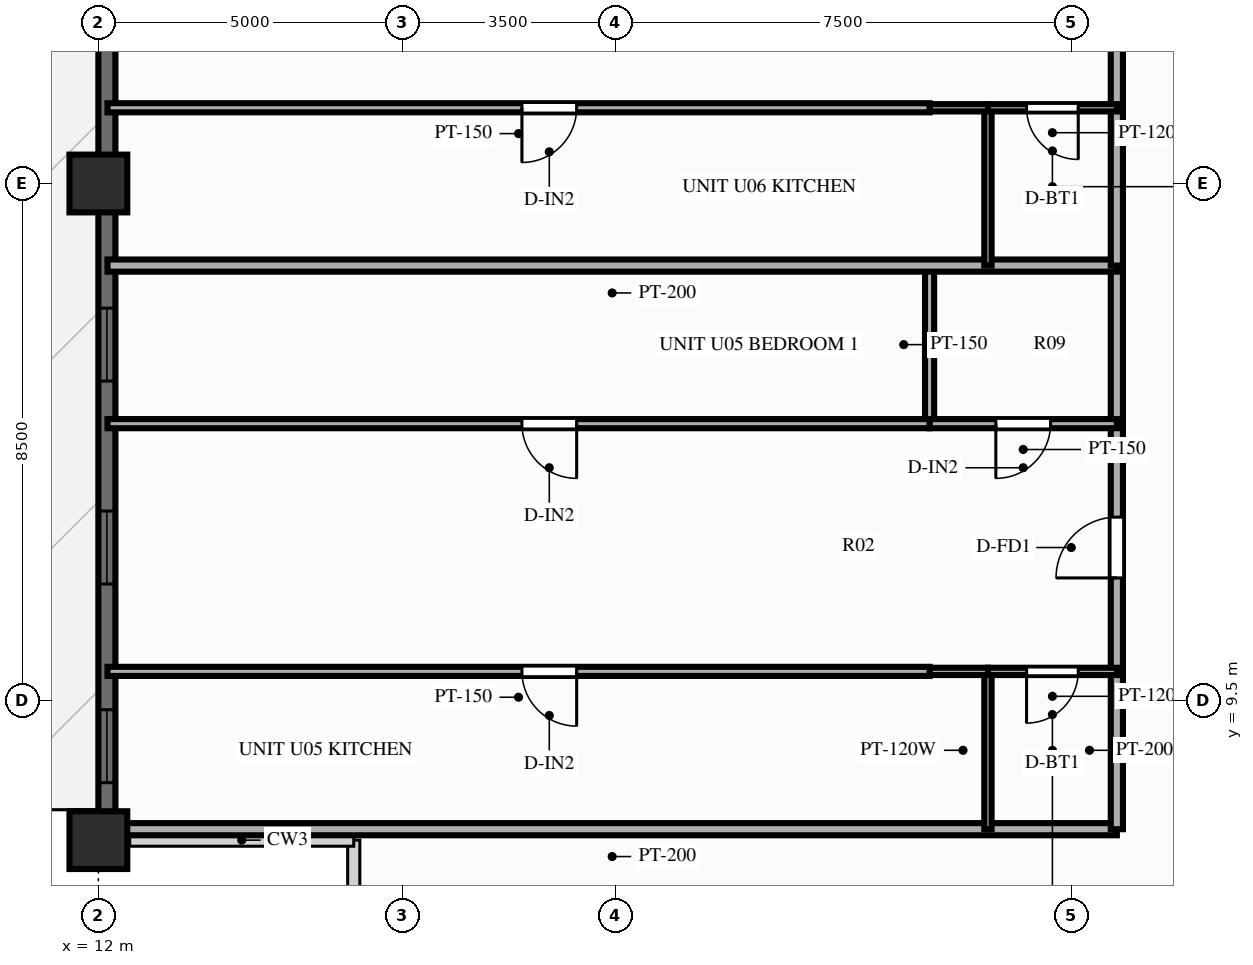
"""IFC4 building model, lengths in metres.
Left out: names, types, materials, properties, quantities, classifications, styles, units other than length and angle.
Written with IfcOpenShell. Run it as: python <this file> out.ifc"""

import sys

from ifc_helpers import new_model, si_unit, direction, frame, frame_2d, origin, origin_2d, place, context, subcontext, project, spatial, rectangle, extrude, source, transform, mapped, element, fill, save


model = new_model("IFC4")
c1 = context("Model", 3, precision=1e-05, world=origin(), true_north=direction((0.0, 1.0)))
c2 = subcontext(c1, "Body", "Model", "MODEL_VIEW")
j1 = project(units=[si_unit("LENGTHUNIT", "METRE"), si_unit("PLANEANGLEUNIT", "RADIAN")], contexts=[c1])
p1 = place(None, origin())
s1 = spatial("IfcSite", under=j1, at=p1, CompositionType="ELEMENT")
p2 = place(p1, origin())
s2 = spatial("IfcBuilding", under=s1, at=p2, CompositionType="ELEMENT")
p3 = place(p2, frame((0.0, 0.0, 116.85)))
s3 = spatial("IfcBuildingStorey", under=s2, at=p3, CompositionType="ELEMENT", Elevation=116.85)
m1 = source(origin(), c2, "Body", "SweptSolid", [
    extrude(rectangle(XDim=0.95, YDim=0.95, at=origin_2d()), origin(), (0.0, 0.0, 1.0), 3.0),
])
for number, where, z_axis, x_axis in (
    (1, (12.0, 18.0, 0.0), (0.0, 0.0, 1.0), (1.0, 0.0, 0.0)),
    (2, (12.0, 7.2, 0.0), (0.0, 0.0, 1.0), (1.0, 0.0, 0.0)),
):
    element("IfcColumn", number, at=place(p3, frame(where, z_axis=z_axis, x_axis=x_axis)), inside=s3, PredefinedType="COLUMN", context=c2, shape_type="MappedRepresentation", body=[
        mapped(m1, transform((0.0, 0.0, 0.0), scale=1.0)),
    ])
p4 = place(p3, frame((12.14, 7.2, 0.0), z_axis=(0.0, 0.0, 1.0), x_axis=(0.0, 1.0, 0.0)))
e3 = element("IfcWall", 3, at=p4, inside=s3, PredefinedType="SOLIDWALL", context=c2, shape_type="SweptSolid", body=[
    extrude(rectangle(XDim=39.6, YDim=0.28, at=frame_2d((19.8, 0.0))), origin(), (0.0, 0.0, 1.0), 2.28),
])
p5 = place(p4, frame((0.945, 0.0, 0.25)))
e4 = element("IfcOpeningElement", 4, at=p5, cuts=e3, PredefinedType="OPENING", context=c2, shape_type="SweptSolid", body=[
    extrude(rectangle(XDim=1.2, YDim=1.5, at=frame_2d((0.6, 0.75))), frame((0.0, 0.152, 0.0), z_axis=(0.0, -1.0, 0.0), x_axis=(1.0, 0.0, 0.0)), (0.0, 0.0, 1.0), 0.304),
])
p6 = place(p4, frame((4.213, 0.0, 0.25)))
e5 = element("IfcOpeningElement", 5, at=p6, cuts=e3, PredefinedType="OPENING", context=c2, shape_type="SweptSolid", body=[
    extrude(rectangle(XDim=1.2, YDim=1.5, at=frame_2d((0.6, 0.75))), frame((0.0, 0.152, 0.0), z_axis=(0.0, -1.0, 0.0), x_axis=(1.0, 0.0, 0.0)), (0.0, 0.0, 1.0), 0.304),
])
p7 = place(p4, frame((7.55, 0.0, 0.25)))
e6 = element("IfcOpeningElement", 6, at=p7, cuts=e3, PredefinedType="OPENING", context=c2, shape_type="SweptSolid", body=[
    extrude(rectangle(XDim=1.2, YDim=1.5, at=frame_2d((0.6, 0.75))), frame((0.0, 0.152, 0.0), z_axis=(0.0, -1.0, 0.0), x_axis=(1.0, 0.0, 0.0)), (0.0, 0.0, 1.0), 0.304),
])
p8 = place(p4, frame((13.483, 0.0, 0.25)))
e7 = element("IfcOpeningElement", 7, at=p8, cuts=e3, PredefinedType="OPENING", context=c2, shape_type="SweptSolid", body=[
    extrude(rectangle(XDim=1.2, YDim=1.5, at=frame_2d((0.6, 0.75))), frame((0.0, 0.152, 0.0), z_axis=(0.0, -1.0, 0.0), x_axis=(1.0, 0.0, 0.0)), (0.0, 0.0, 1.0), 0.304),
])
p9 = place(p4, frame((16.82, 0.0, 0.25)))
e8 = element("IfcOpeningElement", 8, at=p9, cuts=e3, PredefinedType="OPENING", context=c2, shape_type="SweptSolid", body=[
    extrude(rectangle(XDim=1.2, YDim=1.5, at=frame_2d((0.6, 0.75))), frame((0.0, 0.152, 0.0), z_axis=(0.0, -1.0, 0.0), x_axis=(1.0, 0.0, 0.0)), (0.0, 0.0, 1.0), 0.304),
])
p10 = place(p4, frame((19.2, 0.0, 0.25)))
e9 = element("IfcOpeningElement", 9, at=p10, cuts=e3, PredefinedType="OPENING", context=c2, shape_type="SweptSolid", body=[
    extrude(rectangle(XDim=1.2, YDim=1.5, at=frame_2d((0.6, 0.75))), frame((0.0, 0.152, 0.0), z_axis=(0.0, -1.0, 0.0), x_axis=(1.0, 0.0, 0.0)), (0.0, 0.0, 1.0), 0.304),
])
p11 = place(p4, frame((21.992, 0.0, 0.0)))
e10 = element("IfcOpeningElement", 10, at=p11, cuts=e3, PredefinedType="OPENING", context=c2, shape_type="SweptSolid", body=[
    extrude(rectangle(XDim=1.6, YDim=2.15, at=frame_2d((0.8, 1.075))), frame((0.0, 0.152, 0.0), z_axis=(0.0, -1.0, 0.0), x_axis=(1.0, 0.0, 0.0)), (0.0, 0.0, 1.0), 0.304),
])
p12 = place(p4, frame((25.529, 0.0, 0.25)))
e11 = element("IfcOpeningElement", 11, at=p12, cuts=e3, PredefinedType="OPENING", context=c2, shape_type="SweptSolid", body=[
    extrude(rectangle(XDim=1.2, YDim=1.5, at=frame_2d((0.6, 0.75))), frame((0.0, 0.152, 0.0), z_axis=(0.0, -1.0, 0.0), x_axis=(1.0, 0.0, 0.0)), (0.0, 0.0, 1.0), 0.304),
])
p13 = place(p4, frame((29.349, 0.0, 0.25)))
e12 = element("IfcOpeningElement", 12, at=p13, cuts=e3, PredefinedType="OPENING", context=c2, shape_type="SweptSolid", body=[
    extrude(rectangle(XDim=0.7, YDim=1.5, at=frame_2d((0.35, 0.75))), frame((0.0, 0.152, 0.0), z_axis=(0.0, -1.0, 0.0), x_axis=(1.0, 0.0, 0.0)), (0.0, 0.0, 1.0), 0.304),
])
p14 = place(p4, frame((31.285, 0.0, 0.25)))
e13 = element("IfcOpeningElement", 13, at=p14, cuts=e3, PredefinedType="OPENING", context=c2, shape_type="SweptSolid", body=[
    extrude(rectangle(XDim=1.2, YDim=1.5, at=frame_2d((0.6, 0.75))), frame((0.0, 0.152, 0.0), z_axis=(0.0, -1.0, 0.0), x_axis=(1.0, 0.0, 0.0)), (0.0, 0.0, 1.0), 0.304),
])
p15 = place(p4, frame((34.252, 0.0, 0.25)))
e14 = element("IfcOpeningElement", 14, at=p15, cuts=e3, PredefinedType="OPENING", context=c2, shape_type="SweptSolid", body=[
    extrude(rectangle(XDim=1.2, YDim=1.5, at=frame_2d((0.6, 0.75))), frame((0.0, 0.152, 0.0), z_axis=(0.0, -1.0, 0.0), x_axis=(1.0, 0.0, 0.0)), (0.0, 0.0, 1.0), 0.304),
])
p16 = place(p4, frame((37.151, 0.0, 0.25)))
e15 = element("IfcOpeningElement", 15, at=p16, cuts=e3, PredefinedType="OPENING", context=c2, shape_type="SweptSolid", body=[
    extrude(rectangle(XDim=1.2, YDim=1.5, at=frame_2d((0.6, 0.75))), frame((0.0, 0.152, 0.0), z_axis=(0.0, -1.0, 0.0), x_axis=(1.0, 0.0, 0.0)), (0.0, 0.0, 1.0), 0.304),
])
p17 = place(p3, frame((28.75, 7.38, 0.0), z_axis=(0.0, 0.0, 1.0), x_axis=(-1.0, 0.0, 0.0)))
e16 = element("IfcWall", 16, at=p17, inside=s3, PredefinedType="PARTITIONING", context=c2, shape_type="SweptSolid", body=[
    extrude(rectangle(XDim=16.6, YDim=0.2, at=frame_2d((8.3, 0.0))), origin(), (0.0, 0.0, 1.0), 2.79),
])
p18 = place(p3, frame((28.75, 7.38, 0.0), z_axis=(0.0, 0.0, 1.0), x_axis=(0.0, 1.0, 0.0)))
e17 = element("IfcWall", 17, at=p18, inside=s3, PredefinedType="PARTITIONING", context=c2, shape_type="SweptSolid", body=[
    extrude(rectangle(XDim=2.596, YDim=0.2, at=frame_2d((1.298, 0.0))), origin(), (0.0, 0.0, 1.0), 2.79),
])
p19 = place(p3, frame((28.75, 9.976, 0.0), z_axis=(0.0, 0.0, 1.0), x_axis=(0.0, 1.0, 0.0)))
e18 = element("IfcWall", 18, at=p19, inside=s3, PredefinedType="PARTITIONING", context=c2, shape_type="SweptSolid", body=[
    extrude(rectangle(XDim=4.074, YDim=0.2, at=frame_2d((2.037, 0.0))), origin(), (0.0, 0.0, 1.0), 2.79),
])
p20 = place(p19, frame((1.537, 0.0, 0.0)))
e19 = element("IfcOpeningElement", 19, at=p20, cuts=e18, PredefinedType="OPENING", context=c2, shape_type="SweptSolid", body=[
    extrude(rectangle(XDim=1.0, YDim=2.15, at=frame_2d((0.5, 1.075))), frame((0.0, 0.112, 0.0), z_axis=(0.0, -1.0, 0.0), x_axis=(1.0, 0.0, 0.0)), (0.0, 0.0, 1.0), 0.224),
])
p21 = place(p3, frame((28.75, 14.05, 0.0), z_axis=(0.0, 0.0, 1.0), x_axis=(0.0, 1.0, 0.0)))
e20 = element("IfcWall", 20, at=p21, inside=s3, PredefinedType="PARTITIONING", context=c2, shape_type="SweptSolid", body=[
    extrude(rectangle(XDim=2.6, YDim=0.2, at=frame_2d((1.3, 0.0))), origin(), (0.0, 0.0, 1.0), 2.79),
])
p22 = place(p3, frame((26.63, 7.38, 0.0), z_axis=(0.0, 0.0, 1.0), x_axis=(0.0, 1.0, 0.0)))
e21 = element("IfcWall", 21, at=p22, inside=s3, PredefinedType="PARTITIONING", context=c2, shape_type="SweptSolid", body=[
    extrude(rectangle(XDim=2.596, YDim=0.12, at=frame_2d((1.298, 0.0))), origin(), (0.0, 0.0, 1.0), 2.79),
])
p23 = place(p3, frame((25.67, 14.05, 0.0), z_axis=(0.0, 0.0, 1.0), x_axis=(0.0, 1.0, 0.0)))
e22 = element("IfcWall", 22, at=p23, inside=s3, PredefinedType="PARTITIONING", context=c2, shape_type="SweptSolid", body=[
    extrude(rectangle(XDim=2.6, YDim=0.15, at=frame_2d((1.3, 0.0))), origin(), (0.0, 0.0, 1.0), 2.79),
])
p24 = place(p3, frame((28.75, 9.976, 0.0), z_axis=(0.0, 0.0, 1.0), x_axis=(-1.0, 0.0, 0.0)))
e23 = element("IfcWall", 23, at=p24, inside=s3, PredefinedType="PARTITIONING", context=c2, shape_type="SweptSolid", body=[
    extrude(rectangle(XDim=2.12, YDim=0.12, at=frame_2d((1.06, 0.0))), origin(), (0.0, 0.0, 1.0), 2.79),
])
p25 = place(p24, frame((0.635, 0.0, 0.0)))
e24 = element("IfcOpeningElement", 24, at=p25, cuts=e23, PredefinedType="OPENING", context=c2, shape_type="SweptSolid", body=[
    extrude(rectangle(XDim=0.85, YDim=2.05, at=frame_2d((0.425, 1.025))), frame((0.0, 0.072, 0.0), z_axis=(0.0, -1.0, 0.0), x_axis=(1.0, 0.0, 0.0)), (0.0, 0.0, 1.0), 0.144),
])
p26 = place(p3, frame((26.63, 9.976, 0.0), z_axis=(0.0, 0.0, 1.0), x_axis=(-1.0, 0.0, 0.0)))
e25 = element("IfcWall", 25, at=p26, inside=s3, PredefinedType="PARTITIONING", context=c2, shape_type="SweptSolid", body=[
    extrude(rectangle(XDim=0.96, YDim=0.12, at=frame_2d((0.48, 0.0))), origin(), (0.0, 0.0, 1.0), 2.79),
])
p27 = place(p3, frame((25.67, 9.976, 0.0), z_axis=(0.0, 0.0, 1.0), x_axis=(-1.0, 0.0, 0.0)))
e26 = element("IfcWall", 26, at=p27, inside=s3, PredefinedType="PARTITIONING", context=c2, shape_type="SweptSolid", body=[
    extrude(rectangle(XDim=13.52, YDim=0.15, at=frame_2d((6.76, 0.0))), origin(), (0.0, 0.0, 1.0), 2.79),
])
p28 = place(p27, frame((5.804, 0.0, 0.0)))
e27 = element("IfcOpeningElement", 27, at=p28, cuts=e26, PredefinedType="OPENING", context=c2, shape_type="SweptSolid", body=[
    extrude(rectangle(XDim=0.9, YDim=2.1, at=frame_2d((0.45, 1.05))), frame((0.0, 0.087, 0.0), z_axis=(0.0, -1.0, 0.0), x_axis=(1.0, 0.0, 0.0)), (0.0, 0.0, 1.0), 0.174),
])
p29 = place(p3, frame((28.75, 14.05, 0.0), z_axis=(0.0, 0.0, 1.0), x_axis=(-1.0, 0.0, 0.0)))
e28 = element("IfcWall", 28, at=p29, inside=s3, PredefinedType="PARTITIONING", context=c2, shape_type="SweptSolid", body=[
    extrude(rectangle(XDim=3.08, YDim=0.15, at=frame_2d((1.54, 0.0))), origin(), (0.0, 0.0, 1.0), 2.79),
])
p30 = place(p29, frame((1.09, 0.0, 0.0)))
e29 = element("IfcOpeningElement", 29, at=p30, cuts=e28, PredefinedType="OPENING", context=c2, shape_type="SweptSolid", body=[
    extrude(rectangle(XDim=0.9, YDim=2.1, at=frame_2d((0.45, 1.05))), frame((0.0, 0.087, 0.0), z_axis=(0.0, -1.0, 0.0), x_axis=(1.0, 0.0, 0.0)), (0.0, 0.0, 1.0), 0.174),
])
p31 = place(p3, frame((25.67, 14.05, 0.0), z_axis=(0.0, 0.0, 1.0), x_axis=(-1.0, 0.0, 0.0)))
e30 = element("IfcWall", 30, at=p31, inside=s3, PredefinedType="PARTITIONING", context=c2, shape_type="SweptSolid", body=[
    extrude(rectangle(XDim=13.52, YDim=0.15, at=frame_2d((6.76, 0.0))), origin(), (0.0, 0.0, 1.0), 2.79),
])
p32 = place(p31, frame((5.804, 0.0, 0.0)))
e31 = element("IfcOpeningElement", 31, at=p32, cuts=e30, PredefinedType="OPENING", context=c2, shape_type="SweptSolid", body=[
    extrude(rectangle(XDim=0.9, YDim=2.1, at=frame_2d((0.45, 1.05))), frame((0.0, 0.087, 0.0), z_axis=(0.0, -1.0, 0.0), x_axis=(1.0, 0.0, 0.0)), (0.0, 0.0, 1.0), 0.174),
])
p33 = place(p3, frame((28.75, 16.65, 0.0), z_axis=(0.0, 0.0, 1.0), x_axis=(-1.0, 0.0, 0.0)))
e32 = element("IfcWall", 32, at=p33, inside=s3, PredefinedType="PARTITIONING", context=c2, shape_type="SweptSolid", body=[
    extrude(rectangle(XDim=16.6, YDim=0.2, at=frame_2d((8.3, 0.0))), origin(), (0.0, 0.0, 1.0), 2.79),
])
p34 = place(p3, frame((28.75, 16.65, 0.0), z_axis=(0.0, 0.0, 1.0), x_axis=(0.0, 1.0, 0.0)))
e33 = element("IfcWall", 33, at=p34, inside=s3, PredefinedType="PARTITIONING", context=c2, shape_type="SweptSolid", body=[
    extrude(rectangle(XDim=2.596, YDim=0.2, at=frame_2d((1.298, 0.0))), origin(), (0.0, 0.0, 1.0), 2.79),
])
p35 = place(p3, frame((28.75, 19.246, 0.0), z_axis=(0.0, 0.0, 1.0), x_axis=(0.0, 1.0, 0.0)))
e34 = element("IfcWall", 34, at=p35, inside=s3, PredefinedType="PARTITIONING", context=c2, shape_type="SweptSolid", body=[
    extrude(rectangle(XDim=4.074, YDim=0.2, at=frame_2d((2.037, 0.0))), origin(), (0.0, 0.0, 1.0), 2.79),
])
p36 = place(p35, frame((1.537, 0.0, 0.0)))
e35 = element("IfcOpeningElement", 35, at=p36, cuts=e34, PredefinedType="OPENING", context=c2, shape_type="SweptSolid", body=[
    extrude(rectangle(XDim=1.0, YDim=2.15, at=frame_2d((0.5, 1.075))), frame((0.0, 0.112, 0.0), z_axis=(0.0, -1.0, 0.0), x_axis=(1.0, 0.0, 0.0)), (0.0, 0.0, 1.0), 0.224),
])
p37 = place(p3, frame((26.63, 16.65, 0.0), z_axis=(0.0, 0.0, 1.0), x_axis=(0.0, 1.0, 0.0)))
e36 = element("IfcWall", 36, at=p37, inside=s3, PredefinedType="PARTITIONING", context=c2, shape_type="SweptSolid", body=[
    extrude(rectangle(XDim=2.596, YDim=0.12, at=frame_2d((1.298, 0.0))), origin(), (0.0, 0.0, 1.0), 2.79),
])
p38 = place(p3, frame((28.75, 19.246, 0.0), z_axis=(0.0, 0.0, 1.0), x_axis=(-1.0, 0.0, 0.0)))
e37 = element("IfcWall", 37, at=p38, inside=s3, PredefinedType="PARTITIONING", context=c2, shape_type="SweptSolid", body=[
    extrude(rectangle(XDim=2.12, YDim=0.12, at=frame_2d((1.06, 0.0))), origin(), (0.0, 0.0, 1.0), 2.79),
])
p39 = place(p38, frame((0.635, 0.0, 0.0)))
e38 = element("IfcOpeningElement", 38, at=p39, cuts=e37, PredefinedType="OPENING", context=c2, shape_type="SweptSolid", body=[
    extrude(rectangle(XDim=0.85, YDim=2.05, at=frame_2d((0.425, 1.025))), frame((0.0, 0.072, 0.0), z_axis=(0.0, -1.0, 0.0), x_axis=(1.0, 0.0, 0.0)), (0.0, 0.0, 1.0), 0.144),
])
p40 = place(p3, frame((26.63, 19.246, 0.0), z_axis=(0.0, 0.0, 1.0), x_axis=(-1.0, 0.0, 0.0)))
e39 = element("IfcWall", 39, at=p40, inside=s3, PredefinedType="PARTITIONING", context=c2, shape_type="SweptSolid", body=[
    extrude(rectangle(XDim=0.96, YDim=0.12, at=frame_2d((0.48, 0.0))), origin(), (0.0, 0.0, 1.0), 2.79),
])
p41 = place(p3, frame((25.67, 19.246, 0.0), z_axis=(0.0, 0.0, 1.0), x_axis=(-1.0, 0.0, 0.0)))
e40 = element("IfcWall", 40, at=p41, inside=s3, PredefinedType="PARTITIONING", context=c2, shape_type="SweptSolid", body=[
    extrude(rectangle(XDim=13.52, YDim=0.15, at=frame_2d((6.76, 0.0))), origin(), (0.0, 0.0, 1.0), 2.79),
])
p42 = place(p41, frame((5.804, 0.0, 0.0)))
e41 = element("IfcOpeningElement", 41, at=p42, cuts=e40, PredefinedType="OPENING", context=c2, shape_type="SweptSolid", body=[
    extrude(rectangle(XDim=0.9, YDim=2.1, at=frame_2d((0.45, 1.05))), frame((0.0, 0.087, 0.0), z_axis=(0.0, -1.0, 0.0), x_axis=(1.0, 0.0, 0.0)), (0.0, 0.0, 1.0), 0.174),
])
m2 = source(origin(), c2, "Body", "SweptSolid", [
    extrude(rectangle(XDim=1.2, YDim=1.5, at=frame_2d((0.6, 0.75))), frame((0.0, 0.03, 0.0), z_axis=(0.0, -1.0, 0.0), x_axis=(1.0, 0.0, 0.0)), (0.0, 0.0, 1.0), 0.06),
])
p43 = place(p5, origin())
e42 = element("IfcWindow", 42, at=p43, inside=s3, PartitioningType="SINGLE_PANEL", PredefinedType="WINDOW", context=c2, shape_type="MappedRepresentation", body=[
    mapped(m2, transform((0.0, 0.0, 0.0), scale=1.0)),
])
fill(e4, e42)
p44 = place(p6, origin())
e43 = element("IfcWindow", 43, at=p44, inside=s3, PartitioningType="SINGLE_PANEL", PredefinedType="WINDOW", context=c2, shape_type="MappedRepresentation", body=[
    mapped(m2, transform((0.0, 0.0, 0.0), scale=1.0)),
])
fill(e5, e43)
p45 = place(p7, origin())
e44 = element("IfcWindow", 44, at=p45, inside=s3, PartitioningType="SINGLE_PANEL", PredefinedType="WINDOW", context=c2, shape_type="MappedRepresentation", body=[
    mapped(m2, transform((0.0, 0.0, 0.0), scale=1.0)),
])
fill(e6, e44)
m3 = source(origin(), c2, "Body", "SweptSolid", [
    extrude(rectangle(XDim=1.0, YDim=2.15, at=frame_2d((0.5, 1.075))), frame((0.0, 0.025, 0.0), z_axis=(0.0, -1.0, 0.0), x_axis=(1.0, 0.0, 0.0)), (0.0, 0.0, 1.0), 0.05),
])
p46 = place(p20, origin())
e45 = element("IfcDoor", 45, at=p46, inside=s3, OperationType="SINGLE_SWING_LEFT", PredefinedType="DOOR", context=c2, shape_type="MappedRepresentation", body=[
    mapped(m3, transform((0.0, 0.0, 0.0), scale=1.0)),
])
fill(e19, e45)
m4 = source(origin(), c2, "Body", "SweptSolid", [
    extrude(rectangle(XDim=0.85, YDim=2.05, at=frame_2d((0.425, 1.025))), frame((0.0, 0.025, 0.0), z_axis=(0.0, -1.0, 0.0), x_axis=(1.0, 0.0, 0.0)), (0.0, 0.0, 1.0), 0.05),
])
p47 = place(p25, origin())
e46 = element("IfcDoor", 46, at=p47, inside=s3, OperationType="SINGLE_SWING_RIGHT", PredefinedType="DOOR", context=c2, shape_type="MappedRepresentation", body=[
    mapped(m4, transform((0.0, 0.0, 0.0), scale=1.0)),
])
fill(e24, e46)
m5 = source(origin(), c2, "Body", "SweptSolid", [
    extrude(rectangle(XDim=0.9, YDim=2.1, at=frame_2d((0.45, 1.05))), frame((0.0, 0.025, 0.0), z_axis=(0.0, -1.0, 0.0), x_axis=(1.0, 0.0, 0.0)), (0.0, 0.0, 1.0), 0.05),
])
p48 = place(p28, origin())
e47 = element("IfcDoor", 47, at=p48, inside=s3, OperationType="SINGLE_SWING_LEFT", PredefinedType="DOOR", context=c2, shape_type="MappedRepresentation", body=[
    mapped(m5, transform((0.0, 0.0, 0.0), scale=1.0)),
])
fill(e27, e47)
p49 = place(p30, origin())
e48 = element("IfcDoor", 48, at=p49, inside=s3, OperationType="SINGLE_SWING_RIGHT", PredefinedType="DOOR", context=c2, shape_type="MappedRepresentation", body=[
    mapped(m5, transform((0.0, 0.0, 0.0), scale=1.0)),
])
fill(e29, e48)
p50 = place(p32, origin())
e49 = element("IfcDoor", 49, at=p50, inside=s3, OperationType="SINGLE_SWING_LEFT", PredefinedType="DOOR", context=c2, shape_type="MappedRepresentation", body=[
    mapped(m5, transform((0.0, 0.0, 0.0), scale=1.0)),
])
fill(e31, e49)
p51 = place(p39, origin())
e50 = element("IfcDoor", 50, at=p51, inside=s3, OperationType="SINGLE_SWING_LEFT", PredefinedType="DOOR", context=c2, shape_type="MappedRepresentation", body=[
    mapped(m4, transform((0.0, 0.0, 0.0), scale=1.0)),
])
fill(e38, e50)
p52 = place(p42, origin())
e51 = element("IfcDoor", 51, at=p52, inside=s3, OperationType="SINGLE_SWING_RIGHT", PredefinedType="DOOR", context=c2, shape_type="MappedRepresentation", body=[
    mapped(m5, transform((0.0, 0.0, 0.0), scale=1.0)),
])
fill(e41, e51)
save(model, sys.argv[1])
